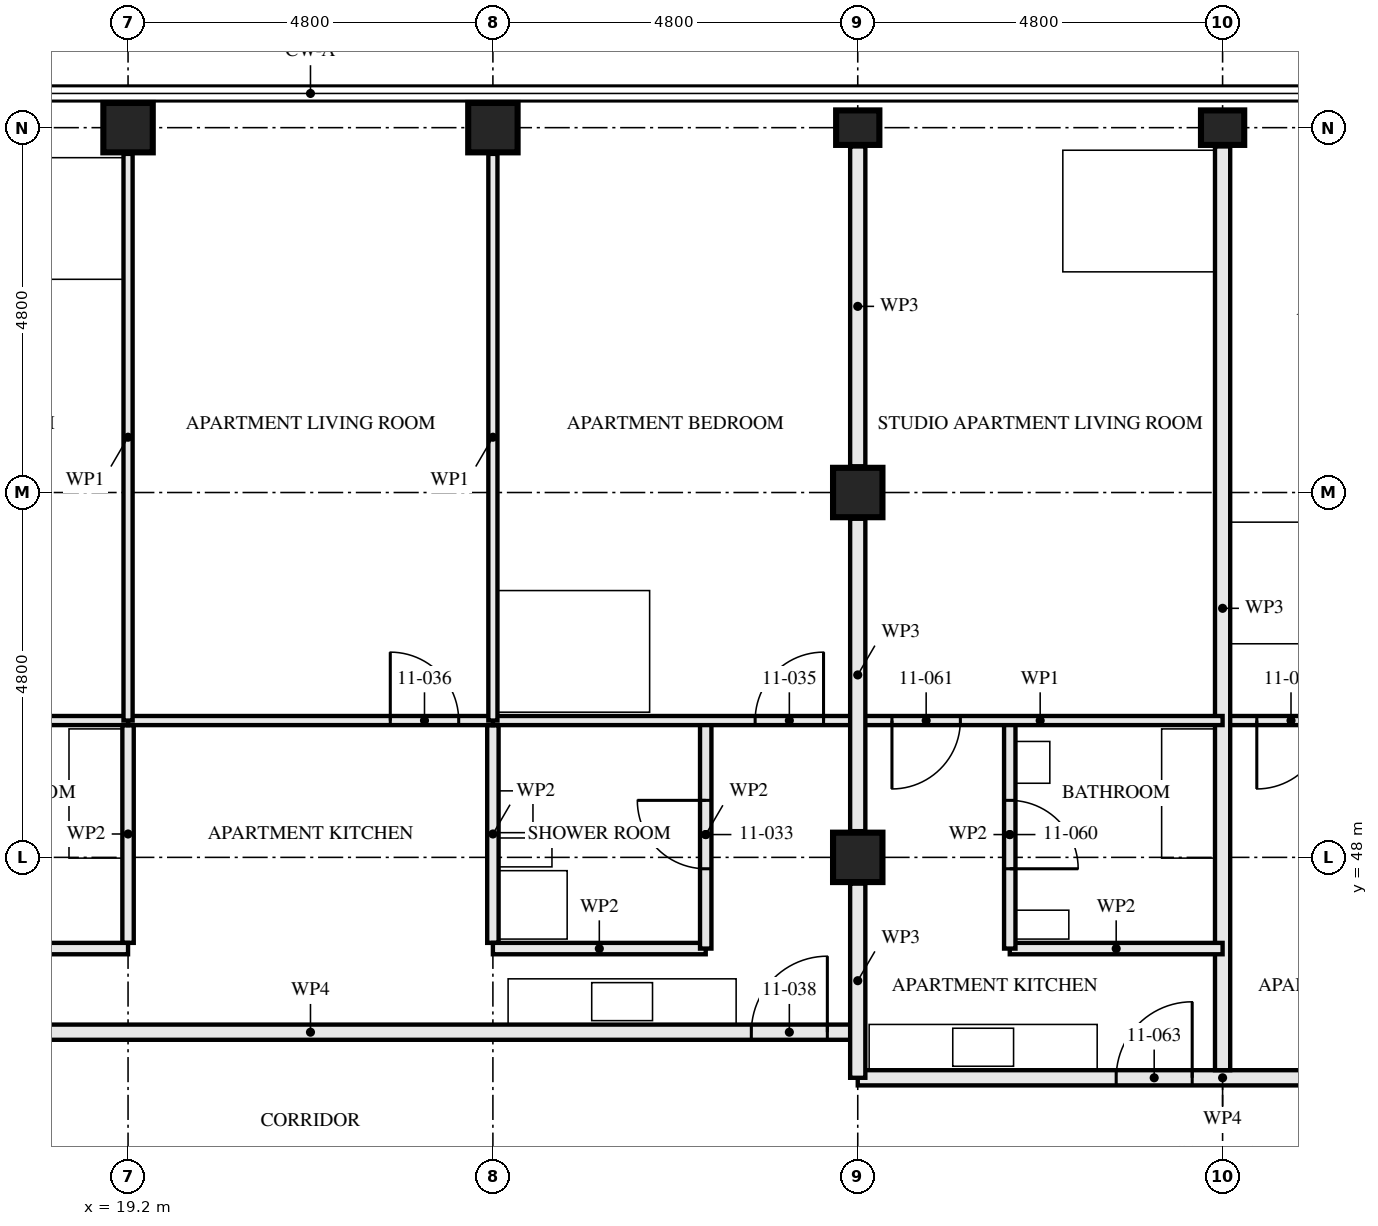
"""IFC4 building model, lengths in metres.
Left out: names, types, materials, properties, quantities, classifications, styles, units other than length and angle.
Written with IfcOpenShell. Run it as: python <this file> out.ifc"""

import sys

from ifc_helpers import new_model, si_unit, direction, frame, frame_2d, origin, origin_2d, place, context, subcontext, project, spatial, rectangle, hollow_rectangle, i_section, extrude, element, fill, save


model = new_model("IFC4")
c1 = context("Model", 3, precision=1e-05, world=origin(), true_north=direction((0.0, 1.0)))
c2 = subcontext(c1, "Body", "Model", "MODEL_VIEW")
j1 = project(units=[si_unit("LENGTHUNIT", "METRE"), si_unit("PLANEANGLEUNIT", "RADIAN")], contexts=[c1])
p1 = place(None, origin())
s1 = spatial("IfcSite", under=j1, at=p1, CompositionType="ELEMENT")
p2 = place(p1, origin())
s2 = spatial("IfcBuilding", under=s1, at=p2, CompositionType="ELEMENT")
p3 = place(p2, frame((0.0, 0.0, 44.5)))
s3 = spatial("IfcBuildingStorey", under=s2, at=p3, CompositionType="ELEMENT", Elevation=44.5)
for number, where, z_axis, x_axis in (
    (1, (19.2, 57.6, 0.0), (0.0, 0.0, 1.0), (0.0, 1.0, 0.0)),
    (2, (24.0, 57.6, 0.0), (0.0, 0.0, 1.0), (0.0, 1.0, 0.0)),
):
    element("IfcColumn", number, at=place(p3, frame(where, z_axis=z_axis, x_axis=x_axis)), inside=s3, PredefinedType="COLUMN", context=c2, shape_type="SweptSolid", body=[
        extrude(hollow_rectangle(XDim=0.65, YDim=0.65, WallThickness=0.08, at=origin_2d()), origin(), (0.0, 0.0, 1.0), 3.5),
    ])
for number, where, z_axis, x_axis in (
    (3, (28.8, 48.0, 0.0), (0.0, 0.0, 1.0), (1.0, 0.0, 0.0)),
    (4, (28.8, 52.8, 0.0), (0.0, 0.0, 1.0), (1.0, 0.0, 0.0)),
):
    element("IfcColumn", number, at=place(p3, frame(where, z_axis=z_axis, x_axis=x_axis)), inside=s3, PredefinedType="COLUMN", context=c2, shape_type="SweptSolid", body=[
        extrude(hollow_rectangle(XDim=0.65, YDim=0.65, WallThickness=0.05, at=origin_2d()), origin(), (0.0, 0.0, 1.0), 3.5),
    ])
for number, where, z_axis, x_axis in (
    (5, (28.8, 57.6, 0.0), (0.0, 0.0, 1.0), (0.0, 1.0, 0.0)),
    (6, (33.6, 57.6, 0.0), (0.0, 0.0, 1.0), (0.0, 1.0, 0.0)),
):
    element("IfcColumn", number, at=place(p3, frame(where, z_axis=z_axis, x_axis=x_axis)), inside=s3, PredefinedType="COLUMN", context=c2, shape_type="SweptSolid", body=[
        extrude(i_section(OverallWidth=0.454, OverallDepth=0.569, WebThickness=0.078, FlangeThickness=0.125, FilletRadius=0.015, at=origin_2d()), origin(), (0.0, 0.0, 1.0), 3.5),
    ])
p4 = place(p3, frame((26.8, 49.8, 0.0), z_axis=(0.0, 0.0, 1.0), x_axis=(0.0, -1.0, 0.0)))
e7 = element("IfcWall", 7, at=p4, inside=s3, PredefinedType="PARTITIONING", context=c2, shape_type="SweptSolid", body=[
    extrude(rectangle(XDim=3.0, YDim=0.15, at=frame_2d((1.5, 0.0))), origin(), (0.0, 0.0, 1.0), 2.55),
])
p5 = place(p4, frame((1.05, 0.0, 0.0)))
e8 = element("IfcOpeningElement", 8, at=p5, cuts=e7, PredefinedType="OPENING", context=c2, shape_type="SweptSolid", body=[
    extrude(rectangle(XDim=0.9, YDim=2.1, at=frame_2d((0.45, 1.05))), frame((0.0, 0.085, 0.0), z_axis=(0.0, -1.0, 0.0), x_axis=(1.0, 0.0, 0.0)), (0.0, 0.0, 1.0), 0.171),
])
for number, where, z_axis, x_axis in (
    (9, (26.8, 46.8, 0.0), (0.0, 0.0, 1.0), (-1.0, 0.0, 0.0)),
    (10, (19.2, 46.8, 0.0), (0.0, 0.0, 1.0), (-1.0, 0.0, 0.0)),
):
    element("IfcWall", number, at=place(p3, frame(where, z_axis=z_axis, x_axis=x_axis)), inside=s3, PredefinedType="PARTITIONING", context=c2, shape_type="SweptSolid", body=[
        extrude(rectangle(XDim=2.8, YDim=0.15, at=frame_2d((1.4, 0.0))), origin(), (0.0, 0.0, 1.0), 3.33),
    ])
p6 = place(p3, frame((28.8, 49.8, 0.0), z_axis=(0.0, 0.0, 1.0), x_axis=(-1.0, 0.0, 0.0)))
e11 = element("IfcWall", 11, at=p6, inside=s3, PredefinedType="PARTITIONING", context=c2, shape_type="SweptSolid", body=[
    extrude(rectangle(XDim=4.8, YDim=0.12, at=frame_2d((2.4, 0.0))), origin(), (0.0, 0.0, 1.0), 3.33),
])
p7 = place(p6, frame((0.45, 0.0, 0.0)))
e12 = element("IfcOpeningElement", 12, at=p7, cuts=e11, PredefinedType="OPENING", context=c2, shape_type="SweptSolid", body=[
    extrude(rectangle(XDim=0.9, YDim=2.1, at=frame_2d((0.45, 1.05))), frame((0.0, 0.071, 0.0), z_axis=(0.0, -1.0, 0.0), x_axis=(1.0, 0.0, 0.0)), (0.0, 0.0, 1.0), 0.141),
])
p8 = place(p3, frame((24.0, 49.8, 0.0), z_axis=(0.0, 0.0, 1.0), x_axis=(-1.0, 0.0, 0.0)))
e13 = element("IfcWall", 13, at=p8, inside=s3, PredefinedType="PARTITIONING", context=c2, shape_type="SweptSolid", body=[
    extrude(rectangle(XDim=4.8, YDim=0.12, at=frame_2d((2.4, 0.0))), origin(), (0.0, 0.0, 1.0), 3.33),
])
p9 = place(p8, frame((0.45, 0.0, 0.0)))
e14 = element("IfcOpeningElement", 14, at=p9, cuts=e13, PredefinedType="OPENING", context=c2, shape_type="SweptSolid", body=[
    extrude(rectangle(XDim=0.9, YDim=2.1, at=frame_2d((0.45, 1.05))), frame((0.0, 0.071, 0.0), z_axis=(0.0, -1.0, 0.0), x_axis=(1.0, 0.0, 0.0)), (0.0, 0.0, 1.0), 0.141),
])
p10 = place(p3, frame((19.2, 49.8, 0.0), z_axis=(0.0, 0.0, 1.0), x_axis=(-1.0, 0.0, 0.0)))
e15 = element("IfcWall", 15, at=p10, inside=s3, PredefinedType="PARTITIONING", context=c2, shape_type="SweptSolid", body=[
    extrude(rectangle(XDim=4.8, YDim=0.12, at=frame_2d((2.4, 0.0))), origin(), (0.0, 0.0, 1.0), 3.33),
])
p11 = place(p10, frame((3.45, 0.0, 0.0)))
e16 = element("IfcOpeningElement", 16, at=p11, cuts=e15, PredefinedType="OPENING", context=c2, shape_type="SweptSolid", body=[
    extrude(rectangle(XDim=0.9, YDim=2.1, at=frame_2d((0.45, 1.05))), frame((0.0, 0.071, 0.0), z_axis=(0.0, -1.0, 0.0), x_axis=(1.0, 0.0, 0.0)), (0.0, 0.0, 1.0), 0.141),
])
for number, where, z_axis, x_axis in (
    (17, (24.0, 57.255, 0.0), (0.0, 0.0, 1.0), (0.0, -1.0, 0.0)),
    (18, (19.2, 57.255, 0.0), (0.0, 0.0, 1.0), (0.0, -1.0, 0.0)),
):
    element("IfcWall", number, at=place(p3, frame(where, z_axis=z_axis, x_axis=x_axis)), inside=s3, PredefinedType="PARTITIONING", context=c2, shape_type="SweptSolid", body=[
        extrude(rectangle(XDim=7.455, YDim=0.12, at=frame_2d((3.728, 0.0))), origin(), (0.0, 0.0, 1.0), 2.55),
    ])
p12 = place(p3, frame((28.8, 45.7, 0.0), z_axis=(0.0, 0.0, 1.0), x_axis=(-1.0, 0.0, 0.0)))
e19 = element("IfcWall", 19, at=p12, inside=s3, PredefinedType="PARTITIONING", context=c2, shape_type="SweptSolid", body=[
    extrude(rectangle(XDim=14.4, YDim=0.2, at=frame_2d((7.2, 0.0))), origin(), (0.0, 0.0, 1.0), 3.33),
])
p13 = place(p12, frame((0.4, 0.0, 0.0)))
e20 = element("IfcOpeningElement", 20, at=p13, cuts=e19, PredefinedType="OPENING", context=c2, shape_type="SweptSolid", body=[
    extrude(rectangle(XDim=1.0, YDim=2.1, at=frame_2d((0.5, 1.05))), frame((0.0, 0.111, 0.0), z_axis=(0.0, -1.0, 0.0), x_axis=(1.0, 0.0, 0.0)), (0.0, 0.0, 1.0), 0.221),
])
p14 = place(p3, frame((38.4, 49.8, 0.0), z_axis=(0.0, 0.0, 1.0), x_axis=(-1.0, 0.0, 0.0)))
e21 = element("IfcWall", 21, at=p14, inside=s3, PredefinedType="PARTITIONING", context=c2, shape_type="SweptSolid", body=[
    extrude(rectangle(XDim=4.8, YDim=0.12, at=frame_2d((2.4, 0.0))), origin(), (0.0, 0.0, 1.0), 3.33),
])
p15 = place(p14, frame((3.45, 0.0, 0.0)))
e22 = element("IfcOpeningElement", 22, at=p15, cuts=e21, PredefinedType="OPENING", context=c2, shape_type="SweptSolid", body=[
    extrude(rectangle(XDim=0.9, YDim=2.1, at=frame_2d((0.45, 1.05))), frame((0.0, 0.071, 0.0), z_axis=(0.0, -1.0, 0.0), x_axis=(1.0, 0.0, 0.0)), (0.0, 0.0, 1.0), 0.141),
])
p16 = place(p3, frame((33.6, 57.353, 0.0), z_axis=(0.0, 0.0, 1.0), x_axis=(0.0, -1.0, 0.0)))
e23 = element("IfcWall", 23, at=p16, inside=s3, PredefinedType="PARTITIONING", context=c2, shape_type="SweptSolid", body=[
    extrude(rectangle(XDim=12.153, YDim=0.2, at=frame_2d((6.077, 0.0))), origin(), (0.0, 0.0, 1.0), 2.55),
])
p17 = place(p3, frame((30.8, 49.8, 0.0), z_axis=(0.0, 0.0, 1.0), x_axis=(0.0, -1.0, 0.0)))
e24 = element("IfcWall", 24, at=p17, inside=s3, PredefinedType="PARTITIONING", context=c2, shape_type="SweptSolid", body=[
    extrude(rectangle(XDim=3.0, YDim=0.15, at=frame_2d((1.5, 0.0))), origin(), (0.0, 0.0, 1.0), 2.55),
])
p18 = place(p17, frame((1.05, 0.0, 0.0)))
e25 = element("IfcOpeningElement", 25, at=p18, cuts=e24, PredefinedType="OPENING", context=c2, shape_type="SweptSolid", body=[
    extrude(rectangle(XDim=0.9, YDim=2.1, at=frame_2d((0.45, 1.05))), frame((0.0, 0.085, 0.0), z_axis=(0.0, -1.0, 0.0), x_axis=(1.0, 0.0, 0.0)), (0.0, 0.0, 1.0), 0.171),
])
p19 = place(p3, frame((33.6, 46.8, 0.0), z_axis=(0.0, 0.0, 1.0), x_axis=(-1.0, 0.0, 0.0)))
e26 = element("IfcWall", 26, at=p19, inside=s3, PredefinedType="PARTITIONING", context=c2, shape_type="SweptSolid", body=[
    extrude(rectangle(XDim=2.8, YDim=0.15, at=frame_2d((1.4, 0.0))), origin(), (0.0, 0.0, 1.0), 3.33),
])
p20 = place(p3, frame((33.6, 49.8, 0.0), z_axis=(0.0, 0.0, 1.0), x_axis=(-1.0, 0.0, 0.0)))
e27 = element("IfcWall", 27, at=p20, inside=s3, PredefinedType="PARTITIONING", context=c2, shape_type="SweptSolid", body=[
    extrude(rectangle(XDim=4.8, YDim=0.12, at=frame_2d((2.4, 0.0))), origin(), (0.0, 0.0, 1.0), 3.33),
])
p21 = place(p20, frame((3.45, 0.0, 0.0)))
e28 = element("IfcOpeningElement", 28, at=p21, cuts=e27, PredefinedType="OPENING", context=c2, shape_type="SweptSolid", body=[
    extrude(rectangle(XDim=0.9, YDim=2.1, at=frame_2d((0.45, 1.05))), frame((0.0, 0.071, 0.0), z_axis=(0.0, -1.0, 0.0), x_axis=(1.0, 0.0, 0.0)), (0.0, 0.0, 1.0), 0.141),
])
p22 = place(p3, frame((38.4, 45.1, 0.0), z_axis=(0.0, 0.0, 1.0), x_axis=(-1.0, 0.0, 0.0)))
e29 = element("IfcWall", 29, at=p22, inside=s3, PredefinedType="PARTITIONING", context=c2, shape_type="SweptSolid", body=[
    extrude(rectangle(XDim=9.6, YDim=0.2, at=frame_2d((4.8, 0.0))), origin(), (0.0, 0.0, 1.0), 3.33),
])
p23 = place(p22, frame((0.4, 0.0, 0.0)))
e30 = element("IfcOpeningElement", 30, at=p23, cuts=e29, PredefinedType="OPENING", context=c2, shape_type="SweptSolid", body=[
    extrude(rectangle(XDim=1.0, YDim=2.1, at=frame_2d((0.5, 1.05))), frame((0.0, 0.111, 0.0), z_axis=(0.0, -1.0, 0.0), x_axis=(1.0, 0.0, 0.0)), (0.0, 0.0, 1.0), 0.221),
])
p24 = place(p22, frame((5.2, 0.0, 0.0)))
e31 = element("IfcOpeningElement", 31, at=p24, cuts=e29, PredefinedType="OPENING", context=c2, shape_type="SweptSolid", body=[
    extrude(rectangle(XDim=1.0, YDim=2.1, at=frame_2d((0.5, 1.05))), frame((0.0, 0.111, 0.0), z_axis=(0.0, -1.0, 0.0), x_axis=(1.0, 0.0, 0.0)), (0.0, 0.0, 1.0), 0.221),
])
p25 = place(p3, frame((28.8, 45.1, 0.0), z_axis=(0.0, 0.0, 1.0), x_axis=(0.0, 1.0, 0.0)))
e32 = element("IfcWall", 32, at=p25, inside=s3, PredefinedType="PARTITIONING", context=c2, shape_type="SweptSolid", body=[
    extrude(rectangle(XDim=2.555, YDim=0.2, at=frame_2d((1.277, 0.0))), origin(), (0.0, 0.0, 1.0), 2.32),
])
p26 = place(p3, frame((28.8, 48.345, 0.0), z_axis=(0.0, 0.0, 1.0), x_axis=(0.0, 1.0, 0.0)))
e33 = element("IfcWall", 33, at=p26, inside=s3, PredefinedType="PARTITIONING", context=c2, shape_type="SweptSolid", body=[
    extrude(rectangle(XDim=4.11, YDim=0.2, at=frame_2d((2.055, 0.0))), origin(), (0.0, 0.0, 1.0), 2.32),
])
p27 = place(p3, frame((28.8, 53.145, 0.0), z_axis=(0.0, 0.0, 1.0), x_axis=(0.0, 1.0, 0.0)))
e34 = element("IfcWall", 34, at=p27, inside=s3, PredefinedType="PARTITIONING", context=c2, shape_type="SweptSolid", body=[
    extrude(rectangle(XDim=4.208, YDim=0.2, at=frame_2d((2.104, 0.0))), origin(), (0.0, 0.0, 1.0), 2.32),
])
for number, where, z_axis, x_axis in (
    (35, (24.0, 46.875, 0.0), (0.0, 0.0, 1.0), (0.0, 1.0, 0.0)),
    (36, (19.2, 49.74, 0.0), (0.0, 0.0, 1.0), (0.0, -1.0, 0.0)),
):
    element("IfcWall", number, at=place(p3, frame(where, z_axis=z_axis, x_axis=x_axis)), inside=s3, PredefinedType="PARTITIONING", context=c2, shape_type="SweptSolid", body=[
        extrude(rectangle(XDim=2.865, YDim=0.15, at=frame_2d((1.433, 0.0))), origin(), (0.0, 0.0, 1.0), 2.55),
    ])
p28 = place(p5, frame((0.9, 0.0, 0.0), z_axis=(0.0, 0.0, 1.0), x_axis=(-1.0, 0.0, 0.0)))
e37 = element("IfcDoor", 37, at=p28, inside=s3, OperationType="SINGLE_SWING_LEFT", PredefinedType="DOOR", context=c2, shape_type="SweptSolid", body=[
    extrude(rectangle(XDim=0.9, YDim=2.1, at=frame_2d((0.45, 1.05))), frame((0.0, 0.022, 0.0), z_axis=(0.0, -1.0, 0.0), x_axis=(1.0, 0.0, 0.0)), (0.0, 0.0, 1.0), 0.044),
])
fill(e8, e37)
p29 = place(p7, frame((0.9, 0.0, 0.0), z_axis=(0.0, 0.0, 1.0), x_axis=(-1.0, 0.0, 0.0)))
e38 = element("IfcDoor", 38, at=p29, inside=s3, OperationType="SINGLE_SWING_LEFT", PredefinedType="DOOR", context=c2, shape_type="SweptSolid", body=[
    extrude(rectangle(XDim=0.9, YDim=2.1, at=frame_2d((0.45, 1.05))), frame((0.0, 0.022, 0.0), z_axis=(0.0, -1.0, 0.0), x_axis=(1.0, 0.0, 0.0)), (0.0, 0.0, 1.0), 0.044),
])
fill(e12, e38)
p30 = place(p9, frame((0.9, 0.0, 0.0), z_axis=(0.0, 0.0, 1.0), x_axis=(-1.0, 0.0, 0.0)))
e39 = element("IfcDoor", 39, at=p30, inside=s3, OperationType="SINGLE_SWING_RIGHT", PredefinedType="DOOR", context=c2, shape_type="SweptSolid", body=[
    extrude(rectangle(XDim=0.9, YDim=2.1, at=frame_2d((0.45, 1.05))), frame((0.0, 0.022, 0.0), z_axis=(0.0, -1.0, 0.0), x_axis=(1.0, 0.0, 0.0)), (0.0, 0.0, 1.0), 0.044),
])
fill(e14, e39)
p31 = place(p13, frame((1.0, 0.0, 0.0), z_axis=(0.0, 0.0, 1.0), x_axis=(-1.0, 0.0, 0.0)))
e40 = element("IfcDoor", 40, at=p31, inside=s3, OperationType="SINGLE_SWING_LEFT", PredefinedType="DOOR", context=c2, shape_type="SweptSolid", body=[
    extrude(rectangle(XDim=1.0, YDim=2.1, at=frame_2d((0.5, 1.05))), frame((0.0, 0.027, 0.0), z_axis=(0.0, -1.0, 0.0), x_axis=(1.0, 0.0, 0.0)), (0.0, 0.0, 1.0), 0.054),
])
fill(e20, e40)
p32 = place(p15, origin())
e41 = element("IfcDoor", 41, at=p32, inside=s3, OperationType="SINGLE_SWING_LEFT", PredefinedType="DOOR", context=c2, shape_type="SweptSolid", body=[
    extrude(rectangle(XDim=0.9, YDim=2.1, at=frame_2d((0.45, 1.05))), frame((0.0, 0.022, 0.0), z_axis=(0.0, -1.0, 0.0), x_axis=(1.0, 0.0, 0.0)), (0.0, 0.0, 1.0), 0.044),
])
fill(e22, e41)
p33 = place(p18, origin())
e42 = element("IfcDoor", 42, at=p33, inside=s3, OperationType="SINGLE_SWING_LEFT", PredefinedType="DOOR", context=c2, shape_type="SweptSolid", body=[
    extrude(rectangle(XDim=0.9, YDim=2.1, at=frame_2d((0.45, 1.05))), frame((0.0, 0.022, 0.0), z_axis=(0.0, -1.0, 0.0), x_axis=(1.0, 0.0, 0.0)), (0.0, 0.0, 1.0), 0.044),
])
fill(e25, e42)
p34 = place(p21, origin())
e43 = element("IfcDoor", 43, at=p34, inside=s3, OperationType="SINGLE_SWING_LEFT", PredefinedType="DOOR", context=c2, shape_type="SweptSolid", body=[
    extrude(rectangle(XDim=0.9, YDim=2.1, at=frame_2d((0.45, 1.05))), frame((0.0, 0.022, 0.0), z_axis=(0.0, -1.0, 0.0), x_axis=(1.0, 0.0, 0.0)), (0.0, 0.0, 1.0), 0.044),
])
fill(e28, e43)
p35 = place(p24, frame((1.0, 0.0, 0.0), z_axis=(0.0, 0.0, 1.0), x_axis=(-1.0, 0.0, 0.0)))
e44 = element("IfcDoor", 44, at=p35, inside=s3, OperationType="SINGLE_SWING_LEFT", PredefinedType="DOOR", context=c2, shape_type="SweptSolid", body=[
    extrude(rectangle(XDim=1.0, YDim=2.1, at=frame_2d((0.5, 1.05))), frame((0.0, 0.027, 0.0), z_axis=(0.0, -1.0, 0.0), x_axis=(1.0, 0.0, 0.0)), (0.0, 0.0, 1.0), 0.054),
])
fill(e31, e44)
save(model, sys.argv[1])
